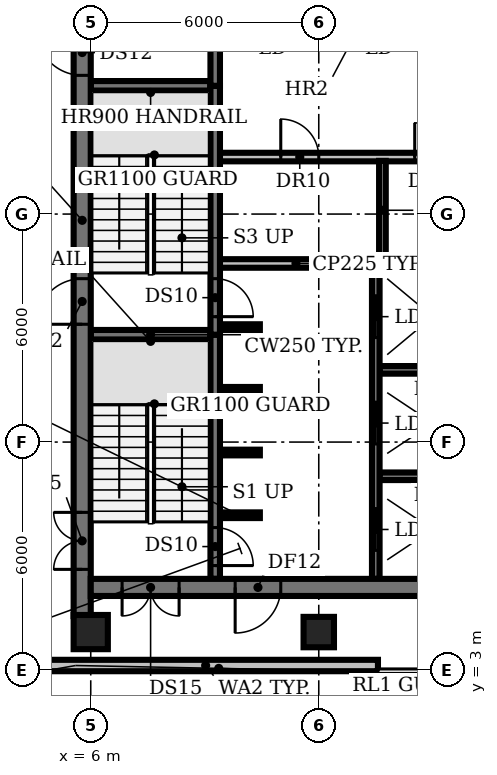
"""IFC4 building model, lengths in metres.
Left out: names, types, materials, properties, quantities, classifications, styles, units other than length and angle.
Written with IfcOpenShell. Run it as: python <this file> out.ifc"""

import sys

from ifc_helpers import new_model, si_unit, direction, frame, frame_2d, origin, origin_2d, place, context, subcontext, project, spatial, rectangle, circle, extrude, element, fill, save


model = new_model("IFC4")
c1 = context("Model", 3, precision=1e-05, world=origin(), true_north=direction((0.0, 1.0)))
c2 = subcontext(c1, "Body", "Model", "MODEL_VIEW")
j1 = project(units=[si_unit("LENGTHUNIT", "METRE"), si_unit("PLANEANGLEUNIT", "RADIAN")], contexts=[c1])
p1 = place(None, origin())
s1 = spatial("IfcSite", under=j1, at=p1, CompositionType="ELEMENT")
p2 = place(p1, origin())
s2 = spatial("IfcBuilding", under=s1, at=p2, CompositionType="ELEMENT")
p3 = place(p2, frame((0.0, 0.0, 239.0)))
s3 = spatial("IfcBuildingStorey", under=s2, at=p3, CompositionType="ELEMENT", Elevation=239.0)
p4 = place(p3, frame((6.0, 4.0, 0.0), z_axis=(0.0, 0.0, 1.0), x_axis=(1.0, 0.0, 0.0)))
e1 = element("IfcColumn", 1, at=p4, inside=s3, PredefinedType="COLUMN", context=c2, shape_type="SweptSolid", body=[
    extrude(circle(Radius=0.45, at=origin_2d()), origin(), (0.0, 0.0, 1.0), 3.85),
])
p5 = place(p3, frame((12.0, 4.0, 0.0), z_axis=(0.0, 0.0, 1.0), x_axis=(1.0, 0.0, 0.0)))
e2 = element("IfcColumn", 2, at=p5, inside=s3, PredefinedType="COLUMN", context=c2, shape_type="SweptSolid", body=[
    extrude(rectangle(XDim=0.8, YDim=0.8, at=origin_2d()), origin(), (0.0, 0.0, 1.0), 3.85),
])
p6 = place(p3, frame((4.489, 3.12, 0.0), z_axis=(0.0, 0.0, 1.0), x_axis=(1.0, 0.0, 0.0)))
e3 = element("IfcWall", 3, at=p6, inside=s3, PredefinedType="SOLIDWALL", context=c2, shape_type="SweptSolid", body=[
    extrude(rectangle(XDim=9.069, YDim=0.3, at=frame_2d((4.535, 0.0))), origin(), (0.0, 0.0, 1.0), 3.85),
])
p7 = place(p3, frame((9.4, 7.075, 0.0), z_axis=(0.0, 0.0, 1.0), x_axis=(1.0, 0.0, 0.0)))
e4 = element("IfcWall", 4, at=p7, inside=s3, PredefinedType="SHEAR", context=c2, shape_type="SweptSolid", body=[
    extrude(rectangle(XDim=1.05, YDim=0.15, at=frame_2d((0.525, 0.0))), origin(), (0.0, 0.0, 1.0), 3.85),
])
p8 = place(p3, frame((13.6, 8.1, 0.0), z_axis=(0.0, 0.0, 1.0), x_axis=(1.0, 0.0, 0.0)))
e5 = element("IfcWall", 5, at=p8, inside=s3, PredefinedType="SHEAR", context=c2, shape_type="SweptSolid", body=[
    extrude(rectangle(XDim=2.8, YDim=0.2, at=frame_2d((1.4, 0.0))), origin(), (0.0, 0.0, 1.0), 3.85),
])
for number, where, z_axis, x_axis in (
    (6, (9.4, 8.725, 0.0), (0.0, 0.0, 1.0), (1.0, 0.0, 0.0)),
    (7, (9.4, 10.375, 0.0), (0.0, 0.0, 1.0), (1.0, 0.0, 0.0)),
):
    element("IfcWall", number, at=place(p3, frame(where, z_axis=z_axis, x_axis=x_axis)), inside=s3, PredefinedType="SHEAR", context=c2, shape_type="SweptSolid", body=[
        extrude(rectangle(XDim=1.05, YDim=0.15, at=frame_2d((0.525, 0.0))), origin(), (0.0, 0.0, 1.0), 3.85),
    ])
p9 = place(p3, frame((13.6, 10.9, 0.0), z_axis=(0.0, 0.0, 1.0), x_axis=(1.0, 0.0, 0.0)))
e8 = element("IfcWall", 8, at=p9, inside=s3, PredefinedType="SHEAR", context=c2, shape_type="SweptSolid", body=[
    extrude(rectangle(XDim=2.8, YDim=0.2, at=frame_2d((1.4, 0.0))), origin(), (0.0, 0.0, 1.0), 3.85),
])
p10 = place(p3, frame((6.0, 11.825, 0.0), z_axis=(0.0, 0.0, 1.0), x_axis=(1.0, 0.0, 0.0)))
e9 = element("IfcWall", 9, at=p10, inside=s3, PredefinedType="SHEAR", context=c2, shape_type="SweptSolid", body=[
    extrude(rectangle(XDim=3.15, YDim=0.25, at=frame_2d((1.575, 0.0))), origin(), (0.0, 0.0, 1.0), 3.85),
])
p11 = place(p3, frame((9.4, 12.025, 0.0), z_axis=(0.0, 0.0, 1.0), x_axis=(1.0, 0.0, 0.0)))
e10 = element("IfcWall", 10, at=p11, inside=s3, PredefinedType="SHEAR", context=c2, shape_type="SweptSolid", body=[
    extrude(rectangle(XDim=1.05, YDim=0.15, at=frame_2d((0.525, 0.0))), origin(), (0.0, 0.0, 1.0), 3.85),
])
p12 = place(p3, frame((9.4, 13.7, 0.0), z_axis=(0.0, 0.0, 1.0), x_axis=(1.0, 0.0, 0.0)))
e11 = element("IfcWall", 11, at=p12, inside=s3, PredefinedType="PARTITIONING", context=c2, shape_type="SweptSolid", body=[
    extrude(rectangle(XDim=4.0, YDim=0.225, at=frame_2d((2.0, 0.0))), origin(), (0.0, 0.0, 1.0), 3.85),
])
p13 = place(p3, frame((13.75, 13.7, 0.0), z_axis=(0.0, 0.0, 1.0), x_axis=(1.0, 0.0, 0.0)))
e12 = element("IfcWall", 12, at=p13, inside=s3, PredefinedType="SHEAR", context=c2, shape_type="SweptSolid", body=[
    extrude(rectangle(XDim=2.45, YDim=0.2, at=frame_2d((1.225, 0.0))), origin(), (0.0, 0.0, 1.0), 3.85),
])
p14 = place(p3, frame((9.4, 16.5, 0.0), z_axis=(0.0, 0.0, 1.0), x_axis=(1.0, 0.0, 0.0)))
e13 = element("IfcWall", 13, at=p14, inside=s3, PredefinedType="PARTITIONING", context=c2, shape_type="SweptSolid", body=[
    extrude(rectangle(XDim=14.6, YDim=0.225, at=frame_2d((7.3, 0.0))), origin(), (0.0, 0.0, 1.0), 3.85),
])
p15 = place(p14, frame((1.6, 0.0, 0.0)))
e14 = element("IfcOpeningElement", 14, at=p15, cuts=e13, PredefinedType="OPENING", context=c2, shape_type="SweptSolid", body=[
    extrude(rectangle(XDim=1.0, YDim=2.1, at=frame_2d((0.5, 1.05))), frame((0.0, 0.123, 0.0), z_axis=(0.0, -1.0, 0.0), x_axis=(1.0, 0.0, 0.0)), (0.0, 0.0, 1.0), 0.245),
])
p16 = place(p14, frame((5.125, 0.0, 0.0)))
e15 = element("IfcOpeningElement", 15, at=p16, cuts=e13, PredefinedType="OPENING", context=c2, shape_type="SweptSolid", body=[
    extrude(rectangle(XDim=0.9, YDim=2.1, at=frame_2d((0.45, 1.05))), frame((0.0, 0.123, 0.0), z_axis=(0.0, -1.0, 0.0), x_axis=(1.0, 0.0, 0.0)), (0.0, 0.0, 1.0), 0.245),
])
p17 = place(p14, frame((7.675, 0.0, 0.0)))
e16 = element("IfcOpeningElement", 16, at=p17, cuts=e13, PredefinedType="OPENING", context=c2, shape_type="SweptSolid", body=[
    extrude(rectangle(XDim=0.9, YDim=2.1, at=frame_2d((0.45, 1.05))), frame((0.0, 0.123, 0.0), z_axis=(0.0, -1.0, 0.0), x_axis=(1.0, 0.0, 0.0)), (0.0, 0.0, 1.0), 0.245),
])
p18 = place(p14, frame((9.775, 0.0, 0.0)))
e17 = element("IfcOpeningElement", 17, at=p18, cuts=e13, PredefinedType="OPENING", context=c2, shape_type="SweptSolid", body=[
    extrude(rectangle(XDim=0.9, YDim=2.1, at=frame_2d((0.45, 1.05))), frame((0.0, 0.123, 0.0), z_axis=(0.0, -1.0, 0.0), x_axis=(1.0, 0.0, 0.0)), (0.0, 0.0, 1.0), 0.245),
])
p19 = place(p14, frame((11.647, 0.0, 0.0)))
e18 = element("IfcOpeningElement", 18, at=p19, cuts=e13, PredefinedType="OPENING", context=c2, shape_type="SweptSolid", body=[
    extrude(rectangle(XDim=0.9, YDim=2.1, at=frame_2d((0.45, 1.05))), frame((0.0, 0.123, 0.0), z_axis=(0.0, -1.0, 0.0), x_axis=(1.0, 0.0, 0.0)), (0.0, 0.0, 1.0), 0.245),
])
p20 = place(p14, frame((13.423, 0.0, 0.0)))
e19 = element("IfcOpeningElement", 19, at=p20, cuts=e13, PredefinedType="OPENING", context=c2, shape_type="SweptSolid", body=[
    extrude(rectangle(XDim=0.9, YDim=2.1, at=frame_2d((0.45, 1.05))), frame((0.0, 0.123, 0.0), z_axis=(0.0, -1.0, 0.0), x_axis=(1.0, 0.0, 0.0)), (0.0, 0.0, 1.0), 0.245),
])
p21 = place(p3, frame((6.0, 18.375, 0.0), z_axis=(0.0, 0.0, 1.0), x_axis=(1.0, 0.0, 0.0)))
e20 = element("IfcWall", 20, at=p21, inside=s3, PredefinedType="SHEAR", context=c2, shape_type="SweptSolid", body=[
    extrude(rectangle(XDim=3.15, YDim=0.25, at=frame_2d((1.575, 0.0))), origin(), (0.0, 0.0, 1.0), 3.85),
])
p22 = place(p3, frame((9.275, 11.825, 0.0), z_axis=(0.0, 0.0, 1.0), x_axis=(0.0, -1.0, 0.0)))
e21 = element("IfcWall", 21, at=p22, inside=s3, PredefinedType="SHEAR", context=c2, shape_type="SweptSolid", body=[
    extrude(rectangle(XDim=6.425, YDim=0.25, at=frame_2d((3.212, 0.0))), origin(), (0.0, 0.0, 1.0), 3.85),
])
p23 = place(p22, frame((5.075, 0.0, 0.0)))
e22 = element("IfcOpeningElement", 22, at=p23, cuts=e21, PredefinedType="OPENING", context=c2, shape_type="SweptSolid", body=[
    extrude(rectangle(XDim=1.0, YDim=2.1, at=frame_2d((0.5, 1.05))), frame((0.0, 0.135, 0.0), z_axis=(0.0, -1.0, 0.0), x_axis=(1.0, 0.0, 0.0)), (0.0, 0.0, 1.0), 0.27),
])
p24 = place(p3, frame((9.275, 18.375, 0.0), z_axis=(0.0, 0.0, 1.0), x_axis=(0.0, -1.0, 0.0)))
e23 = element("IfcWall", 23, at=p24, inside=s3, PredefinedType="SHEAR", context=c2, shape_type="SweptSolid", body=[
    extrude(rectangle(XDim=6.55, YDim=0.25, at=frame_2d((3.275, 0.0))), origin(), (0.0, 0.0, 1.0), 3.85),
])
p25 = place(p24, frame((5.075, 0.0, 0.0)))
e24 = element("IfcOpeningElement", 24, at=p25, cuts=e23, PredefinedType="OPENING", context=c2, shape_type="SweptSolid", body=[
    extrude(rectangle(XDim=1.0, YDim=2.1, at=frame_2d((0.5, 1.05))), frame((0.0, 0.135, 0.0), z_axis=(0.0, -1.0, 0.0), x_axis=(1.0, 0.0, 0.0)), (0.0, 0.0, 1.0), 0.27),
])
p26 = place(p3, frame((9.275, 18.375, 0.0), z_axis=(0.0, 0.0, 1.0), x_axis=(0.0, 1.0, 0.0)))
e25 = element("IfcWall", 25, at=p26, inside=s3, PredefinedType="SHEAR", context=c2, shape_type="SweptSolid", body=[
    extrude(rectangle(XDim=6.425, YDim=0.25, at=frame_2d((3.212, 0.0))), origin(), (0.0, 0.0, 1.0), 3.85),
])
p27 = place(p3, frame((13.5, 5.4, 0.0), z_axis=(0.0, 0.0, 1.0), x_axis=(0.0, 1.0, 0.0)))
e26 = element("IfcWall", 26, at=p27, inside=s3, PredefinedType="SHEAR", context=c2, shape_type="SweptSolid", body=[
    extrude(rectangle(XDim=8.2, YDim=0.2, at=frame_2d((4.1, 0.0))), origin(), (0.0, 0.0, 1.0), 3.85),
])
p28 = place(p27, frame((0.75, 0.0, 0.0)))
e27 = element("IfcOpeningElement", 27, at=p28, cuts=e26, PredefinedType="OPENING", context=c2, shape_type="SweptSolid", body=[
    extrude(rectangle(XDim=1.1, YDim=2.1, at=frame_2d((0.55, 1.05))), frame((0.0, 0.11, 0.0), z_axis=(0.0, -1.0, 0.0), x_axis=(1.0, 0.0, 0.0)), (0.0, 0.0, 1.0), 0.22),
])
p29 = place(p27, frame((3.55, 0.0, 0.0)))
e28 = element("IfcOpeningElement", 28, at=p29, cuts=e26, PredefinedType="OPENING", context=c2, shape_type="SweptSolid", body=[
    extrude(rectangle(XDim=1.1, YDim=2.1, at=frame_2d((0.55, 1.05))), frame((0.0, 0.11, 0.0), z_axis=(0.0, -1.0, 0.0), x_axis=(1.0, 0.0, 0.0)), (0.0, 0.0, 1.0), 0.22),
])
p30 = place(p27, frame((6.35, 0.0, 0.0)))
e29 = element("IfcOpeningElement", 29, at=p30, cuts=e26, PredefinedType="OPENING", context=c2, shape_type="SweptSolid", body=[
    extrude(rectangle(XDim=1.1, YDim=2.1, at=frame_2d((0.55, 1.05))), frame((0.0, 0.11, 0.0), z_axis=(0.0, -1.0, 0.0), x_axis=(1.0, 0.0, 0.0)), (0.0, 0.0, 1.0), 0.22),
])
p31 = place(p3, frame((13.675, 13.8, 0.0), z_axis=(0.0, 0.0, 1.0), x_axis=(0.0, 1.0, 0.0)))
e30 = element("IfcWall", 30, at=p31, inside=s3, PredefinedType="PARTITIONING", context=c2, shape_type="SweptSolid", body=[
    extrude(rectangle(XDim=2.6, YDim=0.175, at=frame_2d((1.3, 0.0))), origin(), (0.0, 0.0, 1.0), 3.85),
])
p32 = place(p3, frame((5.775, 4.42, 0.0), z_axis=(0.0, 0.0, 1.0), x_axis=(0.0, 1.0, 0.0)))
e31 = element("IfcWall", 31, at=p32, inside=s3, PredefinedType="SHEAR", context=c2, shape_type="SweptSolid", body=[
    extrude(rectangle(XDim=20.83, YDim=0.45, at=frame_2d((10.415, 0.0))), origin(), (0.0, 0.0, 1.0), 3.85),
])
p33 = place(p32, frame((1.23, 0.0, 0.0)))
e32 = element("IfcOpeningElement", 32, at=p33, cuts=e31, PredefinedType="OPENING", context=c2, shape_type="SweptSolid", body=[
    extrude(rectangle(XDim=1.5, YDim=2.1, at=frame_2d((0.75, 1.05))), frame((0.0, 0.235, 0.0), z_axis=(0.0, -1.0, 0.0), x_axis=(1.0, 0.0, 0.0)), (0.0, 0.0, 1.0), 0.47),
])
p34 = place(p32, frame((7.68, 0.0, 0.0)))
e33 = element("IfcOpeningElement", 33, at=p34, cuts=e31, PredefinedType="OPENING", context=c2, shape_type="SweptSolid", body=[
    extrude(rectangle(XDim=1.2, YDim=2.1, at=frame_2d((0.6, 1.05))), frame((0.0, 0.235, 0.0), z_axis=(0.0, -1.0, 0.0), x_axis=(1.0, 0.0, 0.0)), (0.0, 0.0, 1.0), 0.47),
])
p35 = place(p32, frame((14.23, 0.0, 0.0)))
e34 = element("IfcOpeningElement", 34, at=p35, cuts=e31, PredefinedType="OPENING", context=c2, shape_type="SweptSolid", body=[
    extrude(rectangle(XDim=1.2, YDim=2.1, at=frame_2d((0.6, 1.05))), frame((0.0, 0.235, 0.0), z_axis=(0.0, -1.0, 0.0), x_axis=(1.0, 0.0, 0.0)), (0.0, 0.0, 1.0), 0.47),
])
p36 = place(p3, frame((24.0, 5.175, 0.0), z_axis=(0.0, 0.0, 1.0), x_axis=(-1.0, 0.0, 0.0)))
e35 = element("IfcWall", 35, at=p36, inside=s3, PredefinedType="SHEAR", context=c2, shape_type="SweptSolid", body=[
    extrude(rectangle(XDim=18.0, YDim=0.45, at=frame_2d((9.0, 0.0))), origin(), (0.0, 0.0, 1.0), 3.85),
])
p37 = place(p36, frame((0.825, 0.0, 0.0)))
e36 = element("IfcOpeningElement", 36, at=p37, cuts=e35, PredefinedType="OPENING", context=c2, shape_type="SweptSolid", body=[
    extrude(rectangle(XDim=1.5, YDim=2.1, at=frame_2d((0.75, 1.05))), frame((0.0, 0.235, 0.0), z_axis=(0.0, -1.0, 0.0), x_axis=(1.0, 0.0, 0.0)), (0.0, 0.0, 1.0), 0.47),
])
p38 = place(p36, frame((15.675, 0.0, 0.0)))
e37 = element("IfcOpeningElement", 37, at=p38, cuts=e35, PredefinedType="OPENING", context=c2, shape_type="SweptSolid", body=[
    extrude(rectangle(XDim=1.5, YDim=2.1, at=frame_2d((0.75, 1.05))), frame((0.0, 0.235, 0.0), z_axis=(0.0, -1.0, 0.0), x_axis=(1.0, 0.0, 0.0)), (0.0, 0.0, 1.0), 0.47),
])
p39 = place(p36, frame((13.0, 0.0, 0.0)))
e38 = element("IfcOpeningElement", 38, at=p39, cuts=e35, PredefinedType="OPENING", context=c2, shape_type="SweptSolid", body=[
    extrude(rectangle(XDim=1.2, YDim=2.1, at=frame_2d((0.6, 1.05))), frame((0.0, 0.235, 0.0), z_axis=(0.0, -1.0, 0.0), x_axis=(1.0, 0.0, 0.0)), (0.0, 0.0, 1.0), 0.47),
])
p40 = place(p36, frame((4.4, 0.0, 0.0)))
e39 = element("IfcOpeningElement", 39, at=p40, cuts=e35, PredefinedType="OPENING", context=c2, shape_type="SweptSolid", body=[
    extrude(rectangle(XDim=1.0, YDim=2.1, at=frame_2d((0.5, 1.05))), frame((0.0, 0.235, 0.0), z_axis=(0.0, -1.0, 0.0), x_axis=(1.0, 0.0, 0.0)), (0.0, 0.0, 1.0), 0.47),
])
p41 = place(p15, origin())
e40 = element("IfcDoor", 40, at=p41, inside=s3, OperationType="SINGLE_SWING_LEFT", PredefinedType="DOOR", context=c2, shape_type="SweptSolid", body=[
    extrude(rectangle(XDim=1.0, YDim=2.1, at=frame_2d((0.5, 1.05))), frame((0.0, 0.025, 0.0), z_axis=(0.0, -1.0, 0.0), x_axis=(1.0, 0.0, 0.0)), (0.0, 0.0, 1.0), 0.05),
])
fill(e14, e40)
p42 = place(p16, origin())
e41 = element("IfcDoor", 41, at=p42, inside=s3, OperationType="SINGLE_SWING_LEFT", PredefinedType="DOOR", context=c2, shape_type="SweptSolid", body=[
    extrude(rectangle(XDim=0.9, YDim=2.1, at=frame_2d((0.45, 1.05))), frame((0.0, 0.025, 0.0), z_axis=(0.0, -1.0, 0.0), x_axis=(1.0, 0.0, 0.0)), (0.0, 0.0, 1.0), 0.05),
])
fill(e15, e41)
p43 = place(p23, origin())
e42 = element("IfcDoor", 42, at=p43, inside=s3, OperationType="SINGLE_SWING_RIGHT", PredefinedType="DOOR", context=c2, shape_type="SweptSolid", body=[
    extrude(rectangle(XDim=1.0, YDim=2.1, at=frame_2d((0.5, 1.05))), frame((0.0, 0.025, 0.0), z_axis=(0.0, -1.0, 0.0), x_axis=(1.0, 0.0, 0.0)), (0.0, 0.0, 1.0), 0.05),
])
fill(e22, e42)
p44 = place(p25, origin())
e43 = element("IfcDoor", 43, at=p44, inside=s3, OperationType="SINGLE_SWING_RIGHT", PredefinedType="DOOR", context=c2, shape_type="SweptSolid", body=[
    extrude(rectangle(XDim=1.0, YDim=2.1, at=frame_2d((0.5, 1.05))), frame((0.0, 0.025, 0.0), z_axis=(0.0, -1.0, 0.0), x_axis=(1.0, 0.0, 0.0)), (0.0, 0.0, 1.0), 0.05),
])
fill(e24, e43)
p45 = place(p28, origin())
e44 = element("IfcDoor", 44, at=p45, inside=s3, OperationType="DOUBLE_DOOR_SLIDING", PredefinedType="DOOR", context=c2, shape_type="SweptSolid", body=[
    extrude(rectangle(XDim=1.1, YDim=2.1, at=frame_2d((0.55, 1.05))), frame((0.0, 0.025, 0.0), z_axis=(0.0, -1.0, 0.0), x_axis=(1.0, 0.0, 0.0)), (0.0, 0.0, 1.0), 0.05),
])
fill(e27, e44)
p46 = place(p29, origin())
e45 = element("IfcDoor", 45, at=p46, inside=s3, OperationType="DOUBLE_DOOR_SLIDING", PredefinedType="DOOR", context=c2, shape_type="SweptSolid", body=[
    extrude(rectangle(XDim=1.1, YDim=2.1, at=frame_2d((0.55, 1.05))), frame((0.0, 0.025, 0.0), z_axis=(0.0, -1.0, 0.0), x_axis=(1.0, 0.0, 0.0)), (0.0, 0.0, 1.0), 0.05),
])
fill(e28, e45)
p47 = place(p30, origin())
e46 = element("IfcDoor", 46, at=p47, inside=s3, OperationType="DOUBLE_DOOR_SLIDING", PredefinedType="DOOR", context=c2, shape_type="SweptSolid", body=[
    extrude(rectangle(XDim=1.1, YDim=2.1, at=frame_2d((0.55, 1.05))), frame((0.0, 0.025, 0.0), z_axis=(0.0, -1.0, 0.0), x_axis=(1.0, 0.0, 0.0)), (0.0, 0.0, 1.0), 0.05),
])
fill(e29, e46)
p48 = place(p33, origin())
e47 = element("IfcDoor", 47, at=p48, inside=s3, OperationType="DOUBLE_DOOR_SINGLE_SWING", PredefinedType="DOOR", context=c2, shape_type="SweptSolid", body=[
    extrude(rectangle(XDim=1.5, YDim=2.1, at=frame_2d((0.75, 1.05))), frame((0.0, 0.025, 0.0), z_axis=(0.0, -1.0, 0.0), x_axis=(1.0, 0.0, 0.0)), (0.0, 0.0, 1.0), 0.05),
])
fill(e32, e47)
p49 = place(p34, origin())
e48 = element("IfcDoor", 48, at=p49, inside=s3, OperationType="SINGLE_SWING_LEFT", PredefinedType="DOOR", context=c2, shape_type="SweptSolid", body=[
    extrude(rectangle(XDim=1.2, YDim=2.1, at=frame_2d((0.6, 1.05))), frame((0.0, 0.025, 0.0), z_axis=(0.0, -1.0, 0.0), x_axis=(1.0, 0.0, 0.0)), (0.0, 0.0, 1.0), 0.05),
])
fill(e33, e48)
p50 = place(p35, origin())
e49 = element("IfcDoor", 49, at=p50, inside=s3, OperationType="SINGLE_SWING_RIGHT", PredefinedType="DOOR", context=c2, shape_type="SweptSolid", body=[
    extrude(rectangle(XDim=1.2, YDim=2.1, at=frame_2d((0.6, 1.05))), frame((0.0, 0.025, 0.0), z_axis=(0.0, -1.0, 0.0), x_axis=(1.0, 0.0, 0.0)), (0.0, 0.0, 1.0), 0.05),
])
fill(e34, e49)
p51 = place(p38, origin())
e50 = element("IfcDoor", 50, at=p51, inside=s3, OperationType="DOUBLE_DOOR_SINGLE_SWING", PredefinedType="DOOR", context=c2, shape_type="SweptSolid", body=[
    extrude(rectangle(XDim=1.5, YDim=2.1, at=frame_2d((0.75, 1.05))), frame((0.0, 0.025, 0.0), z_axis=(0.0, -1.0, 0.0), x_axis=(1.0, 0.0, 0.0)), (0.0, 0.0, 1.0), 0.05),
])
fill(e37, e50)
p52 = place(p39, origin())
e51 = element("IfcDoor", 51, at=p52, inside=s3, OperationType="SINGLE_SWING_RIGHT", PredefinedType="DOOR", context=c2, shape_type="SweptSolid", body=[
    extrude(rectangle(XDim=1.2, YDim=2.1, at=frame_2d((0.6, 1.05))), frame((0.0, 0.025, 0.0), z_axis=(0.0, -1.0, 0.0), x_axis=(1.0, 0.0, 0.0)), (0.0, 0.0, 1.0), 0.05),
])
fill(e38, e51)
save(model, sys.argv[1])
